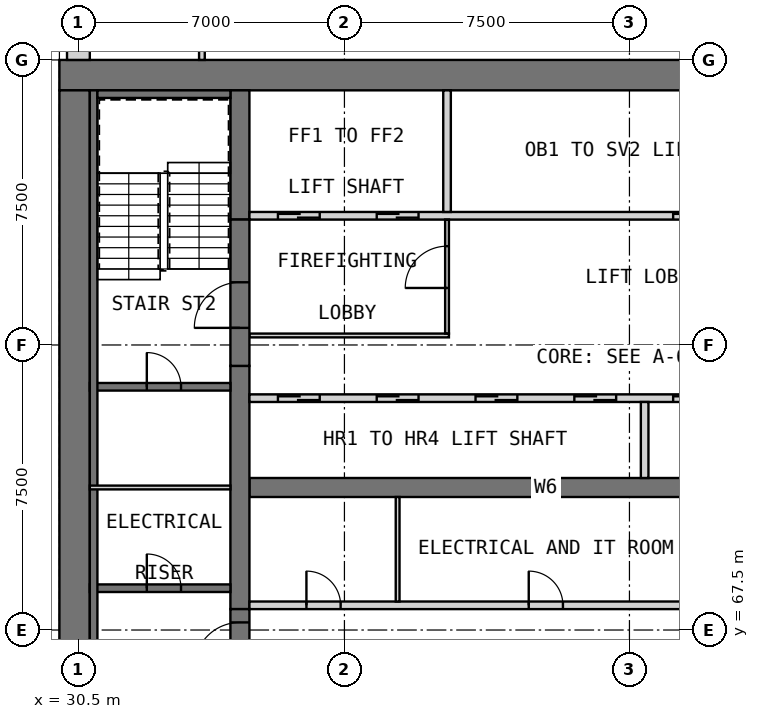
"""IFC4 building model, lengths in metres.
Left out: names, types, materials, properties, quantities, classifications, styles, units other than length and angle.
Written with IfcOpenShell. Run it as: python <this file> out.ifc"""

import sys

from ifc_helpers import new_model, si_unit, direction, frame, frame_2d, origin, place, context, subcontext, project, spatial, rectangle, extrude, element, fill, save


model = new_model("IFC4")
c1 = context("Model", 3, precision=1e-05, world=origin(), true_north=direction((0.0, 1.0)))
c2 = subcontext(c1, "Body", "Model", "MODEL_VIEW")
j1 = project(units=[si_unit("LENGTHUNIT", "METRE"), si_unit("PLANEANGLEUNIT", "RADIAN")], contexts=[c1])
p1 = place(None, origin())
s1 = spatial("IfcSite", under=j1, at=p1, CompositionType="ELEMENT")
p2 = place(p1, origin())
s2 = spatial("IfcBuilding", under=s1, at=p2, CompositionType="ELEMENT")
p3 = place(p2, frame((0.0, 0.0, 189.7)))
s3 = spatial("IfcBuildingStorey", under=s2, at=p3, CompositionType="ELEMENT", Elevation=189.7)
p4 = place(p3, frame((30.0, 82.1, 0.0), z_axis=(0.0, 0.0, 1.0), x_axis=(1.0, 0.0, 0.0)))
e1 = element("IfcWall", 1, at=p4, inside=s3, PredefinedType="SHEAR", context=c2, shape_type="SweptSolid", body=[
    extrude(rectangle(XDim=30.0, YDim=0.8, at=frame_2d((15.0, 0.0))), origin(), (0.0, 0.0, 1.0), 3.5),
])
p5 = place(p3, frame((30.4, 60.8, 0.0), z_axis=(0.0, 0.0, 1.0), x_axis=(0.0, 1.0, 0.0)))
e2 = element("IfcWall", 2, at=p5, inside=s3, PredefinedType="SHEAR", context=c2, shape_type="SweptSolid", body=[
    extrude(rectangle(XDim=20.9, YDim=0.8, at=frame_2d((10.45, 0.0))), origin(), (0.0, 0.0, 1.0), 3.5),
])
p6 = place(p3, frame((35.0, 71.25, 0.0), z_axis=(0.0, 0.0, 1.0), x_axis=(1.0, 0.0, 0.0)))
e3 = element("IfcWall", 3, at=p6, inside=s3, PredefinedType="SHEAR", context=c2, shape_type="SweptSolid", body=[
    extrude(rectangle(XDim=15.6, YDim=0.5, at=frame_2d((7.8, 0.0))), origin(), (0.0, 0.0, 1.0), 3.5),
])
p7 = place(p3, frame((34.75, 68.05, 0.0), z_axis=(0.0, 0.0, 1.0), x_axis=(0.0, 1.0, 0.0)))
e4 = element("IfcWall", 4, at=p7, inside=s3, PredefinedType="SHEAR", context=c2, shape_type="SweptSolid", body=[
    extrude(rectangle(XDim=6.4, YDim=0.5, at=frame_2d((3.2, 0.0))), origin(), (0.0, 0.0, 1.0), 3.5),
])
p8 = place(p3, frame((34.75, 78.3, 0.0), z_axis=(0.0, 0.0, 1.0), x_axis=(0.0, 1.0, 0.0)))
e5 = element("IfcWall", 5, at=p8, inside=s3, PredefinedType="SHEAR", context=c2, shape_type="SweptSolid", body=[
    extrude(rectangle(XDim=3.4, YDim=0.5, at=frame_2d((1.7, 0.0))), origin(), (0.0, 0.0, 1.0), 3.5),
])
p9 = place(p2, frame((0.0, 0.0, 34.0)))
s4 = spatial("IfcBuildingStorey", under=s2, at=p9, CompositionType="ELEMENT", Elevation=34.0)
for number, where, z_axis, x_axis in (
    (6, (29.7, 70.8, 0.0), (0.0, 0.0, 1.0), (0.0, 1.0, 0.0)),
    (7, (29.7, 75.675, 0.0), (0.0, 0.0, 1.0), (0.0, 1.0, 0.0)),
    (8, (29.7, 80.55, 0.0), (0.0, 0.0, 1.0), (0.0, 1.0, 0.0)),
):
    element("IfcWall", number, at=place(p9, frame(where, z_axis=z_axis, x_axis=x_axis)), inside=s4, PredefinedType="SOLIDWALL", context=c2, shape_type="SweptSolid", body=[
        extrude(rectangle(XDim=0.9, YDim=0.6, at=frame_2d((0.45, 0.0))), origin(), (0.0, 0.0, 1.0), 286.2),
    ])
p10 = place(p3, frame((30.5, 89.5, 0.0), z_axis=(0.0, 0.0, 1.0), x_axis=(0.0, -1.0, 0.0)))
e9 = element("IfcWall", 9, at=p10, inside=s3, PredefinedType="SOLIDWALL", context=c2, shape_type="SweptSolid", body=[
    extrude(rectangle(XDim=7.0, YDim=0.6, at=frame_2d((3.5, 0.0))), origin(), (0.0, 0.0, 1.0), 3.25),
])
p11 = place(p10, frame((3.925, 0.0, 0.8)))
e10 = element("IfcOpeningElement", 10, at=p11, cuts=e9, PredefinedType="OPENING", context=c2, shape_type="SweptSolid", body=[
    extrude(rectangle(XDim=2.4, YDim=1.8, at=frame_2d((1.2, 0.9))), frame((0.0, 0.31, 0.0), z_axis=(0.0, -1.0, 0.0), x_axis=(1.0, 0.0, 0.0)), (0.0, 0.0, 1.0), 0.62),
])
p12 = place(p10, frame((0.425, 0.0, 0.8)))
e11 = element("IfcOpeningElement", 11, at=p12, cuts=e9, PredefinedType="OPENING", context=c2, shape_type="SweptSolid", body=[
    extrude(rectangle(XDim=2.4, YDim=1.8, at=frame_2d((1.2, 0.9))), frame((0.0, 0.31, 0.0), z_axis=(0.0, -1.0, 0.0), x_axis=(1.0, 0.0, 0.0)), (0.0, 0.0, 1.0), 0.62),
])
p13 = place(p3, frame((35.0, 68.15, 0.0), z_axis=(0.0, 0.0, 1.0), x_axis=(1.0, 0.0, 0.0)))
e12 = element("IfcWall", 12, at=p13, inside=s3, PredefinedType="PARTITIONING", context=c2, shape_type="SweptSolid", body=[
    extrude(rectangle(XDim=15.6, YDim=0.2, at=frame_2d((7.8, 0.0))), origin(), (0.0, 0.0, 1.0), 3.25),
])
p14 = place(p13, frame((1.5, 0.0, 0.0)))
e13 = element("IfcOpeningElement", 13, at=p14, cuts=e12, PredefinedType="OPENING", context=c2, shape_type="SweptSolid", body=[
    extrude(rectangle(XDim=0.9, YDim=2.1, at=frame_2d((0.45, 1.05))), frame((0.0, 0.11, 0.0), z_axis=(0.0, -1.0, 0.0), x_axis=(1.0, 0.0, 0.0)), (0.0, 0.0, 1.0), 0.22),
])
p15 = place(p13, frame((7.35, 0.0, 0.0)))
e14 = element("IfcOpeningElement", 14, at=p15, cuts=e12, PredefinedType="OPENING", context=c2, shape_type="SweptSolid", body=[
    extrude(rectangle(XDim=0.9, YDim=2.1, at=frame_2d((0.45, 1.05))), frame((0.0, 0.11, 0.0), z_axis=(0.0, -1.0, 0.0), x_axis=(1.0, 0.0, 0.0)), (0.0, 0.0, 1.0), 0.22),
])
p16 = place(p13, frame((13.2, 0.0, 0.0)))
e15 = element("IfcOpeningElement", 15, at=p16, cuts=e12, PredefinedType="OPENING", context=c2, shape_type="SweptSolid", body=[
    extrude(rectangle(XDim=0.9, YDim=2.1, at=frame_2d((0.45, 1.05))), frame((0.0, 0.11, 0.0), z_axis=(0.0, -1.0, 0.0), x_axis=(1.0, 0.0, 0.0)), (0.0, 0.0, 1.0), 0.22),
])
p17 = place(p3, frame((38.9, 68.25, 0.0), z_axis=(0.0, 0.0, 1.0), x_axis=(0.0, 1.0, 0.0)))
e16 = element("IfcWall", 16, at=p17, inside=s3, PredefinedType="PARTITIONING", context=c2, shape_type="SweptSolid", body=[
    extrude(rectangle(XDim=2.75, YDim=0.1, at=frame_2d((1.375, 0.0))), origin(), (0.0, 0.0, 1.0), 3.25),
])
p18 = place(p3, frame((35.0, 73.6, 0.0), z_axis=(0.0, 0.0, 1.0), x_axis=(1.0, 0.0, 0.0)))
e17 = element("IfcWall", 17, at=p18, inside=s3, PredefinedType="SOLIDWALL", context=c2, shape_type="SweptSolid", body=[
    extrude(rectangle(XDim=15.6, YDim=0.2, at=frame_2d((7.8, 0.0))), origin(), (0.0, 0.0, 1.0), 3.5),
])
p19 = place(p18, frame((0.75, 0.0, 0.0)))
e18 = element("IfcOpeningElement", 18, at=p19, cuts=e17, PredefinedType="OPENING", context=c2, shape_type="SweptSolid", body=[
    extrude(rectangle(XDim=1.1, YDim=2.1, at=frame_2d((0.55, 1.05))), frame((0.0, 0.11, 0.0), z_axis=(0.0, -1.0, 0.0), x_axis=(1.0, 0.0, 0.0)), (0.0, 0.0, 1.0), 0.22),
])
p20 = place(p18, frame((3.35, 0.0, 0.0)))
e19 = element("IfcOpeningElement", 19, at=p20, cuts=e17, PredefinedType="OPENING", context=c2, shape_type="SweptSolid", body=[
    extrude(rectangle(XDim=1.1, YDim=2.1, at=frame_2d((0.55, 1.05))), frame((0.0, 0.11, 0.0), z_axis=(0.0, -1.0, 0.0), x_axis=(1.0, 0.0, 0.0)), (0.0, 0.0, 1.0), 0.22),
])
p21 = place(p18, frame((5.95, 0.0, 0.0)))
e20 = element("IfcOpeningElement", 20, at=p21, cuts=e17, PredefinedType="OPENING", context=c2, shape_type="SweptSolid", body=[
    extrude(rectangle(XDim=1.1, YDim=2.1, at=frame_2d((0.55, 1.05))), frame((0.0, 0.11, 0.0), z_axis=(0.0, -1.0, 0.0), x_axis=(1.0, 0.0, 0.0)), (0.0, 0.0, 1.0), 0.22),
])
p22 = place(p18, frame((8.55, 0.0, 0.0)))
e21 = element("IfcOpeningElement", 21, at=p22, cuts=e17, PredefinedType="OPENING", context=c2, shape_type="SweptSolid", body=[
    extrude(rectangle(XDim=1.1, YDim=2.1, at=frame_2d((0.55, 1.05))), frame((0.0, 0.11, 0.0), z_axis=(0.0, -1.0, 0.0), x_axis=(1.0, 0.0, 0.0)), (0.0, 0.0, 1.0), 0.22),
])
p23 = place(p18, frame((11.15, 0.0, 0.0)))
e22 = element("IfcOpeningElement", 22, at=p23, cuts=e17, PredefinedType="OPENING", context=c2, shape_type="SweptSolid", body=[
    extrude(rectangle(XDim=1.1, YDim=2.1, at=frame_2d((0.55, 1.05))), frame((0.0, 0.11, 0.0), z_axis=(0.0, -1.0, 0.0), x_axis=(1.0, 0.0, 0.0)), (0.0, 0.0, 1.0), 0.22),
])
p24 = place(p18, frame((13.75, 0.0, 0.0)))
e23 = element("IfcOpeningElement", 23, at=p24, cuts=e17, PredefinedType="OPENING", context=c2, shape_type="SweptSolid", body=[
    extrude(rectangle(XDim=1.1, YDim=2.1, at=frame_2d((0.55, 1.05))), frame((0.0, 0.11, 0.0), z_axis=(0.0, -1.0, 0.0), x_axis=(1.0, 0.0, 0.0)), (0.0, 0.0, 1.0), 0.22),
])
p25 = place(p3, frame((45.4, 71.5, 0.0), z_axis=(0.0, 0.0, 1.0), x_axis=(0.0, 1.0, 0.0)))
e24 = element("IfcWall", 24, at=p25, inside=s3, PredefinedType="SOLIDWALL", context=c2, shape_type="SweptSolid", body=[
    extrude(rectangle(XDim=2.0, YDim=0.2, at=frame_2d((1.0, 0.0))), origin(), (0.0, 0.0, 1.0), 3.5),
])
p26 = place(p3, frame((35.0, 78.4, 0.0), z_axis=(0.0, 0.0, 1.0), x_axis=(1.0, 0.0, 0.0)))
e25 = element("IfcWall", 25, at=p26, inside=s3, PredefinedType="SOLIDWALL", context=c2, shape_type="SweptSolid", body=[
    extrude(rectangle(XDim=15.6, YDim=0.2, at=frame_2d((7.8, 0.0))), origin(), (0.0, 0.0, 1.0), 3.5),
])
p27 = place(p26, frame((0.75, 0.0, 0.0)))
e26 = element("IfcOpeningElement", 26, at=p27, cuts=e25, PredefinedType="OPENING", context=c2, shape_type="SweptSolid", body=[
    extrude(rectangle(XDim=1.1, YDim=2.1, at=frame_2d((0.55, 1.05))), frame((0.0, 0.11, 0.0), z_axis=(0.0, -1.0, 0.0), x_axis=(1.0, 0.0, 0.0)), (0.0, 0.0, 1.0), 0.22),
])
p28 = place(p26, frame((3.35, 0.0, 0.0)))
e27 = element("IfcOpeningElement", 27, at=p28, cuts=e25, PredefinedType="OPENING", context=c2, shape_type="SweptSolid", body=[
    extrude(rectangle(XDim=1.1, YDim=2.1, at=frame_2d((0.55, 1.05))), frame((0.0, 0.11, 0.0), z_axis=(0.0, -1.0, 0.0), x_axis=(1.0, 0.0, 0.0)), (0.0, 0.0, 1.0), 0.22),
])
p29 = place(p26, frame((11.15, 0.0, 0.0)))
e28 = element("IfcOpeningElement", 28, at=p29, cuts=e25, PredefinedType="OPENING", context=c2, shape_type="SweptSolid", body=[
    extrude(rectangle(XDim=1.1, YDim=2.1, at=frame_2d((0.55, 1.05))), frame((0.0, 0.11, 0.0), z_axis=(0.0, -1.0, 0.0), x_axis=(1.0, 0.0, 0.0)), (0.0, 0.0, 1.0), 0.22),
])
p30 = place(p26, frame((13.75, 0.0, 0.0)))
e29 = element("IfcOpeningElement", 29, at=p30, cuts=e25, PredefinedType="OPENING", context=c2, shape_type="SweptSolid", body=[
    extrude(rectangle(XDim=1.1, YDim=2.1, at=frame_2d((0.55, 1.05))), frame((0.0, 0.11, 0.0), z_axis=(0.0, -1.0, 0.0), x_axis=(1.0, 0.0, 0.0)), (0.0, 0.0, 1.0), 0.22),
])
p31 = place(p3, frame((40.2, 78.5, 0.0), z_axis=(0.0, 0.0, 1.0), x_axis=(0.0, 1.0, 0.0)))
e30 = element("IfcWall", 30, at=p31, inside=s3, PredefinedType="SOLIDWALL", context=c2, shape_type="SweptSolid", body=[
    extrude(rectangle(XDim=3.2, YDim=0.2, at=frame_2d((1.6, 0.0))), origin(), (0.0, 0.0, 1.0), 3.5),
])
p32 = place(p3, frame((35.0, 75.25, 0.0), z_axis=(0.0, 0.0, 1.0), x_axis=(1.0, 0.0, 0.0)))
e31 = element("IfcWall", 31, at=p32, inside=s3, PredefinedType="PARTITIONING", context=c2, shape_type="SweptSolid", body=[
    extrude(rectangle(XDim=5.25, YDim=0.1, at=frame_2d((2.625, 0.0))), origin(), (0.0, 0.0, 1.0), 3.25),
])
p33 = place(p3, frame((40.2, 75.3, 0.0), z_axis=(0.0, 0.0, 1.0), x_axis=(0.0, 1.0, 0.0)))
e32 = element("IfcWall", 32, at=p33, inside=s3, PredefinedType="PARTITIONING", context=c2, shape_type="SweptSolid", body=[
    extrude(rectangle(XDim=3.0, YDim=0.1, at=frame_2d((1.5, 0.0))), origin(), (0.0, 0.0, 1.0), 3.25),
])
p34 = place(p33, frame((1.2, 0.0, 0.0)))
e33 = element("IfcOpeningElement", 33, at=p34, cuts=e32, PredefinedType="OPENING", context=c2, shape_type="SweptSolid", body=[
    extrude(rectangle(XDim=1.1, YDim=2.1, at=frame_2d((0.55, 1.05))), frame((0.0, 0.06, 0.0), z_axis=(0.0, -1.0, 0.0), x_axis=(1.0, 0.0, 0.0)), (0.0, 0.0, 1.0), 0.12),
])
p35 = place(p3, frame((34.75, 64.2, 0.0), z_axis=(0.0, 0.0, 1.0), x_axis=(0.0, 1.0, 0.0)))
e34 = element("IfcWall", 34, at=p35, inside=s3, PredefinedType="SOLIDWALL", context=c2, shape_type="SweptSolid", body=[
    extrude(rectangle(XDim=3.85, YDim=0.5, at=frame_2d((1.925, 0.0))), origin(), (0.0, 0.0, 1.0), 2.3),
])
p36 = place(p35, frame((2.3, 0.0, 0.0)))
e35 = element("IfcOpeningElement", 35, at=p36, cuts=e34, PredefinedType="OPENING", context=c2, shape_type="SweptSolid", body=[
    extrude(rectangle(XDim=1.2, YDim=2.1, at=frame_2d((0.6, 1.05))), frame((0.0, 0.26, 0.0), z_axis=(0.0, -1.0, 0.0), x_axis=(1.0, 0.0, 0.0)), (0.0, 0.0, 1.0), 0.52),
])
p37 = place(p3, frame((34.75, 74.45, 0.0), z_axis=(0.0, 0.0, 1.0), x_axis=(0.0, 1.0, 0.0)))
e36 = element("IfcWall", 36, at=p37, inside=s3, PredefinedType="SOLIDWALL", context=c2, shape_type="SweptSolid", body=[
    extrude(rectangle(XDim=3.85, YDim=0.5, at=frame_2d((1.925, 0.0))), origin(), (0.0, 0.0, 1.0), 2.3),
])
p38 = place(p37, frame((1.0, 0.0, 0.0)))
e37 = element("IfcOpeningElement", 37, at=p38, cuts=e36, PredefinedType="OPENING", context=c2, shape_type="SweptSolid", body=[
    extrude(rectangle(XDim=1.2, YDim=2.1, at=frame_2d((0.6, 1.05))), frame((0.0, 0.26, 0.0), z_axis=(0.0, -1.0, 0.0), x_axis=(1.0, 0.0, 0.0)), (0.0, 0.0, 1.0), 0.52),
])
p39 = place(p3, frame((30.8, 68.6, 0.0), z_axis=(0.0, 0.0, 1.0), x_axis=(1.0, 0.0, 0.0)))
e38 = element("IfcWall", 38, at=p39, inside=s3, PredefinedType="SOLIDWALL", context=c2, shape_type="SweptSolid", body=[
    extrude(rectangle(XDim=3.7, YDim=0.2, at=frame_2d((1.85, 0.0))), origin(), (0.0, 0.0, 1.0), 3.25),
])
p40 = place(p39, frame((1.5, 0.0, 0.0)))
e39 = element("IfcOpeningElement", 39, at=p40, cuts=e38, PredefinedType="OPENING", context=c2, shape_type="SweptSolid", body=[
    extrude(rectangle(XDim=0.9, YDim=2.1, at=frame_2d((0.45, 1.05))), frame((0.0, 0.11, 0.0), z_axis=(0.0, -1.0, 0.0), x_axis=(1.0, 0.0, 0.0)), (0.0, 0.0, 1.0), 0.22),
])
p41 = place(p3, frame((30.8, 73.9, 0.0), z_axis=(0.0, 0.0, 1.0), x_axis=(1.0, 0.0, 0.0)))
e40 = element("IfcWall", 40, at=p41, inside=s3, PredefinedType="SOLIDWALL", context=c2, shape_type="SweptSolid", body=[
    extrude(rectangle(XDim=3.7, YDim=0.2, at=frame_2d((1.85, 0.0))), origin(), (0.0, 0.0, 1.0), 3.25),
])
p42 = place(p41, frame((1.5, 0.0, 0.0)))
e41 = element("IfcOpeningElement", 41, at=p42, cuts=e40, PredefinedType="OPENING", context=c2, shape_type="SweptSolid", body=[
    extrude(rectangle(XDim=0.9, YDim=2.1, at=frame_2d((0.45, 1.05))), frame((0.0, 0.11, 0.0), z_axis=(0.0, -1.0, 0.0), x_axis=(1.0, 0.0, 0.0)), (0.0, 0.0, 1.0), 0.22),
])
p43 = place(p3, frame((30.9, 60.8, 0.0), z_axis=(0.0, 0.0, 1.0), x_axis=(0.0, 1.0, 0.0)))
e42 = element("IfcWall", 42, at=p43, inside=s3, PredefinedType="SOLIDWALL", context=c2, shape_type="SweptSolid", body=[
    extrude(rectangle(XDim=20.9, YDim=0.2, at=frame_2d((10.45, 0.0))), origin(), (0.0, 0.0, 1.0), 3.25),
])
p44 = place(p3, frame((31.0, 81.6, 0.0), z_axis=(0.0, 0.0, 1.0), x_axis=(1.0, 0.0, 0.0)))
e43 = element("IfcWall", 43, at=p44, inside=s3, PredefinedType="SOLIDWALL", context=c2, shape_type="SweptSolid", body=[
    extrude(rectangle(XDim=3.5, YDim=0.2, at=frame_2d((1.75, 0.0))), origin(), (0.0, 0.0, 1.0), 3.25),
])
p45 = place(p3, frame((30.8, 71.25, 0.0), z_axis=(0.0, 0.0, 1.0), x_axis=(1.0, 0.0, 0.0)))
e44 = element("IfcWall", 44, at=p45, inside=s3, PredefinedType="PARTITIONING", context=c2, shape_type="SweptSolid", body=[
    extrude(rectangle(XDim=3.7, YDim=0.1, at=frame_2d((1.85, 0.0))), origin(), (0.0, 0.0, 1.0), 3.25),
])
p46 = place(p3, frame((33.75, 82.5, 0.0), z_axis=(0.0, 0.0, 1.0), x_axis=(0.0, 1.0, 0.0)))
e45 = element("IfcWall", 45, at=p46, inside=s3, PredefinedType="PARTITIONING", context=c2, shape_type="SweptSolid", body=[
    extrude(rectangle(XDim=2.025, YDim=0.15, at=frame_2d((1.012, 0.0))), origin(), (0.0, 0.0, 1.0), 3.25),
])
p47 = place(p14, origin())
e46 = element("IfcDoor", 46, at=p47, inside=s3, OperationType="SINGLE_SWING_RIGHT", PredefinedType="DOOR", context=c2, shape_type="SweptSolid", body=[
    extrude(rectangle(XDim=0.9, YDim=2.1, at=frame_2d((0.45, 1.05))), frame((0.0, 0.025, 0.0), z_axis=(0.0, -1.0, 0.0), x_axis=(1.0, 0.0, 0.0)), (0.0, 0.0, 1.0), 0.05),
])
fill(e13, e46)
p48 = place(p15, origin())
e47 = element("IfcDoor", 47, at=p48, inside=s3, OperationType="SINGLE_SWING_LEFT", PredefinedType="DOOR", context=c2, shape_type="SweptSolid", body=[
    extrude(rectangle(XDim=0.9, YDim=2.1, at=frame_2d((0.45, 1.05))), frame((0.0, 0.025, 0.0), z_axis=(0.0, -1.0, 0.0), x_axis=(1.0, 0.0, 0.0)), (0.0, 0.0, 1.0), 0.05),
])
fill(e14, e47)
p49 = place(p19, origin())
e48 = element("IfcDoor", 48, at=p49, inside=s3, OperationType="DOUBLE_DOOR_SLIDING", PredefinedType="DOOR", context=c2, shape_type="SweptSolid", body=[
    extrude(rectangle(XDim=1.1, YDim=2.1, at=frame_2d((0.55, 1.05))), frame((0.0, 0.025, 0.0), z_axis=(0.0, -1.0, 0.0), x_axis=(1.0, 0.0, 0.0)), (0.0, 0.0, 1.0), 0.05),
])
fill(e18, e48)
p50 = place(p20, origin())
e49 = element("IfcDoor", 49, at=p50, inside=s3, OperationType="DOUBLE_DOOR_SLIDING", PredefinedType="DOOR", context=c2, shape_type="SweptSolid", body=[
    extrude(rectangle(XDim=1.1, YDim=2.1, at=frame_2d((0.55, 1.05))), frame((0.0, 0.025, 0.0), z_axis=(0.0, -1.0, 0.0), x_axis=(1.0, 0.0, 0.0)), (0.0, 0.0, 1.0), 0.05),
])
fill(e19, e49)
p51 = place(p21, origin())
e50 = element("IfcDoor", 50, at=p51, inside=s3, OperationType="DOUBLE_DOOR_SLIDING", PredefinedType="DOOR", context=c2, shape_type="SweptSolid", body=[
    extrude(rectangle(XDim=1.1, YDim=2.1, at=frame_2d((0.55, 1.05))), frame((0.0, 0.025, 0.0), z_axis=(0.0, -1.0, 0.0), x_axis=(1.0, 0.0, 0.0)), (0.0, 0.0, 1.0), 0.05),
])
fill(e20, e50)
p52 = place(p22, origin())
e51 = element("IfcDoor", 51, at=p52, inside=s3, OperationType="DOUBLE_DOOR_SLIDING", PredefinedType="DOOR", context=c2, shape_type="SweptSolid", body=[
    extrude(rectangle(XDim=1.1, YDim=2.1, at=frame_2d((0.55, 1.05))), frame((0.0, 0.025, 0.0), z_axis=(0.0, -1.0, 0.0), x_axis=(1.0, 0.0, 0.0)), (0.0, 0.0, 1.0), 0.05),
])
fill(e21, e51)
p53 = place(p23, origin())
e52 = element("IfcDoor", 52, at=p53, inside=s3, OperationType="DOUBLE_DOOR_SLIDING", PredefinedType="DOOR", context=c2, shape_type="SweptSolid", body=[
    extrude(rectangle(XDim=1.1, YDim=2.1, at=frame_2d((0.55, 1.05))), frame((0.0, 0.025, 0.0), z_axis=(0.0, -1.0, 0.0), x_axis=(1.0, 0.0, 0.0)), (0.0, 0.0, 1.0), 0.05),
])
fill(e22, e52)
p54 = place(p27, origin())
e53 = element("IfcDoor", 53, at=p54, inside=s3, OperationType="DOUBLE_DOOR_SLIDING", PredefinedType="DOOR", context=c2, shape_type="SweptSolid", body=[
    extrude(rectangle(XDim=1.1, YDim=2.1, at=frame_2d((0.55, 1.05))), frame((0.0, 0.025, 0.0), z_axis=(0.0, -1.0, 0.0), x_axis=(1.0, 0.0, 0.0)), (0.0, 0.0, 1.0), 0.05),
])
fill(e26, e53)
p55 = place(p28, origin())
e54 = element("IfcDoor", 54, at=p55, inside=s3, OperationType="DOUBLE_DOOR_SLIDING", PredefinedType="DOOR", context=c2, shape_type="SweptSolid", body=[
    extrude(rectangle(XDim=1.1, YDim=2.1, at=frame_2d((0.55, 1.05))), frame((0.0, 0.025, 0.0), z_axis=(0.0, -1.0, 0.0), x_axis=(1.0, 0.0, 0.0)), (0.0, 0.0, 1.0), 0.05),
])
fill(e27, e54)
p56 = place(p29, origin())
e55 = element("IfcDoor", 55, at=p56, inside=s3, OperationType="DOUBLE_DOOR_SLIDING", PredefinedType="DOOR", context=c2, shape_type="SweptSolid", body=[
    extrude(rectangle(XDim=1.1, YDim=2.1, at=frame_2d((0.55, 1.05))), frame((0.0, 0.025, 0.0), z_axis=(0.0, -1.0, 0.0), x_axis=(1.0, 0.0, 0.0)), (0.0, 0.0, 1.0), 0.05),
])
fill(e28, e55)
p57 = place(p34, origin())
e56 = element("IfcDoor", 56, at=p57, inside=s3, OperationType="SINGLE_SWING_LEFT", PredefinedType="DOOR", context=c2, shape_type="SweptSolid", body=[
    extrude(rectangle(XDim=1.1, YDim=2.1, at=frame_2d((0.55, 1.05))), frame((0.0, 0.025, 0.0), z_axis=(0.0, -1.0, 0.0), x_axis=(1.0, 0.0, 0.0)), (0.0, 0.0, 1.0), 0.05),
])
fill(e33, e56)
p58 = place(p36, origin())
e57 = element("IfcDoor", 57, at=p58, inside=s3, OperationType="SINGLE_SWING_LEFT", PredefinedType="DOOR", context=c2, shape_type="SweptSolid", body=[
    extrude(rectangle(XDim=1.2, YDim=2.1, at=frame_2d((0.6, 1.05))), frame((0.0, 0.025, 0.0), z_axis=(0.0, -1.0, 0.0), x_axis=(1.0, 0.0, 0.0)), (0.0, 0.0, 1.0), 0.05),
])
fill(e35, e57)
p59 = place(p38, origin())
e58 = element("IfcDoor", 58, at=p59, inside=s3, OperationType="SINGLE_SWING_RIGHT", PredefinedType="DOOR", context=c2, shape_type="SweptSolid", body=[
    extrude(rectangle(XDim=1.2, YDim=2.1, at=frame_2d((0.6, 1.05))), frame((0.0, 0.025, 0.0), z_axis=(0.0, -1.0, 0.0), x_axis=(1.0, 0.0, 0.0)), (0.0, 0.0, 1.0), 0.05),
])
fill(e37, e58)
p60 = place(p40, origin())
e59 = element("IfcDoor", 59, at=p60, inside=s3, OperationType="SINGLE_SWING_LEFT", PredefinedType="DOOR", context=c2, shape_type="SweptSolid", body=[
    extrude(rectangle(XDim=0.9, YDim=2.1, at=frame_2d((0.45, 1.05))), frame((0.0, 0.025, 0.0), z_axis=(0.0, -1.0, 0.0), x_axis=(1.0, 0.0, 0.0)), (0.0, 0.0, 1.0), 0.05),
])
fill(e39, e59)
p61 = place(p42, origin())
e60 = element("IfcDoor", 60, at=p61, inside=s3, OperationType="SINGLE_SWING_RIGHT", PredefinedType="DOOR", context=c2, shape_type="SweptSolid", body=[
    extrude(rectangle(XDim=0.9, YDim=2.1, at=frame_2d((0.45, 1.05))), frame((0.0, 0.025, 0.0), z_axis=(0.0, -1.0, 0.0), x_axis=(1.0, 0.0, 0.0)), (0.0, 0.0, 1.0), 0.05),
])
fill(e41, e60)
save(model, sys.argv[1])
